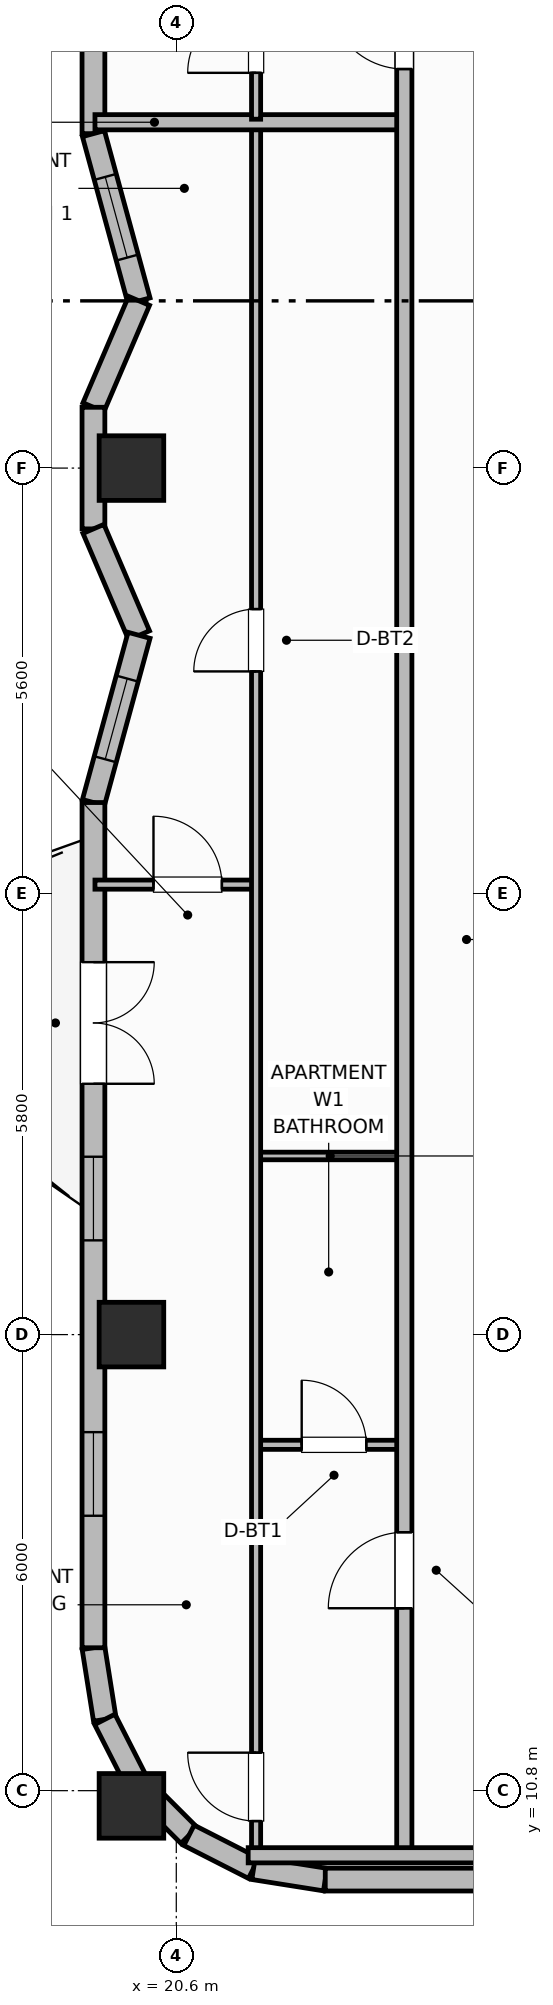
"""IFC4 building model, lengths in metres.
Left out: names, types, materials, properties, quantities, classifications, styles, units other than length and angle.
Written with IfcOpenShell. Run it as: python <this file> out.ifc"""

import sys

from ifc_helpers import new_model, si_unit, direction, frame, frame_2d, origin, origin_2d, place, context, subcontext, project, spatial, rectangle, extrude, element, fill, save


model = new_model("IFC4")
c1 = context("Model", 3, precision=1e-05, world=origin(), true_north=direction((0.0, 1.0)))
c2 = subcontext(c1, "Body", "Model", "MODEL_VIEW")
j1 = project(units=[si_unit("LENGTHUNIT", "METRE"), si_unit("PLANEANGLEUNIT", "RADIAN")], contexts=[c1])
p1 = place(None, origin())
s1 = spatial("IfcSite", under=j1, at=p1, CompositionType="ELEMENT")
p2 = place(p1, origin())
s2 = spatial("IfcBuilding", under=s1, at=p2, CompositionType="ELEMENT")
p3 = place(p2, frame((0.0, 0.0, 251.7)))
s3 = spatial("IfcBuildingStorey", under=s2, at=p3, CompositionType="ELEMENT", Elevation=251.7)
for number, where, z_axis, x_axis in (
    (1, (20.01, 10.6, 0.0), (0.0, 0.0, 1.0), (1.0, 0.0, 0.0)),
    (2, (20.01, 16.8, 0.0), (0.0, 0.0, 1.0), (1.0, 0.0, 0.0)),
    (3, (20.01, 28.2, 0.0), (0.0, 0.0, 1.0), (1.0, 0.0, 0.0)),
):
    element("IfcColumn", number, at=place(p3, frame(where, z_axis=z_axis, x_axis=x_axis)), inside=s3, PredefinedType="COLUMN", context=c2, shape_type="SweptSolid", body=[
        extrude(rectangle(XDim=0.85, YDim=0.85, at=origin_2d()), origin(), (0.0, 0.0, 1.0), 3.7),
    ])
p4 = place(p3, frame((19.51, 12.68, 0.0), z_axis=(0.0, 0.0, 1.0), x_axis=(0.156343617883, -0.987702725088, 0.0)))
e4 = element("IfcWall", 4, at=p4, inside=s3, PredefinedType="SOLIDWALL", context=c2, shape_type="SweptSolid", body=[
    extrude(rectangle(XDim=0.954, YDim=0.3, at=frame_2d((0.477, 0.0))), origin(), (0.0, 0.0, 1.0), 2.73),
])
for number, where, z_axis, x_axis in (
    (5, (19.659, 11.738, 0.0), (0.0, 0.0, 1.0), (0.454, -0.891, 0.0)),
    (6, (20.093, 10.887, 0.0), (0.0, 0.0, 1.0), (0.707, -0.707, 0.0)),
):
    element("IfcWall", number, at=place(p3, frame(where, z_axis=z_axis, x_axis=x_axis)), inside=s3, PredefinedType="SOLIDWALL", context=c2, shape_type="SweptSolid", body=[
        extrude(rectangle(XDim=0.954, YDim=0.3, at=frame_2d((0.477, 0.0))), origin(), (0.0, 0.0, 1.0), 2.73),
    ])
p5 = place(p3, frame((20.767, 10.212, 0.0), z_axis=(0.0, 0.0, 1.0), x_axis=(0.891023873617, -0.45395644796, 0.0)))
e7 = element("IfcWall", 7, at=p5, inside=s3, PredefinedType="SOLIDWALL", context=c2, shape_type="SweptSolid", body=[
    extrude(rectangle(XDim=0.954, YDim=0.3, at=frame_2d((0.477, 0.0))), origin(), (0.0, 0.0, 1.0), 2.73),
])
p6 = place(p3, frame((21.617, 9.779, 0.0), z_axis=(0.0, 0.0, 1.0), x_axis=(0.987669453596, -0.156553666304, 0.0)))
e8 = element("IfcWall", 8, at=p6, inside=s3, PredefinedType="SOLIDWALL", context=c2, shape_type="SweptSolid", body=[
    extrude(rectangle(XDim=0.954, YDim=0.3, at=frame_2d((0.477, 0.0))), origin(), (0.0, 0.0, 1.0), 2.73),
])
p7 = place(p3, frame((22.56, 9.63, 0.0), z_axis=(0.0, 0.0, 1.0), x_axis=(1.0, 0.0, 0.0)))
e9 = element("IfcWall", 9, at=p7, inside=s3, PredefinedType="SOLIDWALL", context=c2, shape_type="SweptSolid", body=[
    extrude(rectangle(XDim=33.28, YDim=0.3, at=frame_2d((16.64, 0.0))), origin(), (0.0, 0.0, 1.0), 2.73),
])
p8 = place(p7, frame((4.461, 0.0, 0.95)))
e10 = element("IfcOpeningElement", 10, at=p8, cuts=e9, PredefinedType="OPENING", context=c2, shape_type="SweptSolid", body=[
    extrude(rectangle(XDim=1.1, YDim=1.65, at=frame_2d((0.55, 0.825))), frame((0.0, 0.16, 0.0), z_axis=(0.0, -1.0, 0.0), x_axis=(1.0, 0.0, 0.0)), (0.0, 0.0, 1.0), 0.32),
])
p9 = place(p7, frame((7.368, 0.0, 0.95)))
e11 = element("IfcOpeningElement", 11, at=p9, cuts=e9, PredefinedType="OPENING", context=c2, shape_type="SweptSolid", body=[
    extrude(rectangle(XDim=1.1, YDim=1.65, at=frame_2d((0.55, 0.825))), frame((0.0, 0.16, 0.0), z_axis=(0.0, -1.0, 0.0), x_axis=(1.0, 0.0, 0.0)), (0.0, 0.0, 1.0), 0.32),
])
p10 = place(p7, frame((10.275, 0.0, 0.95)))
e12 = element("IfcOpeningElement", 12, at=p10, cuts=e9, PredefinedType="OPENING", context=c2, shape_type="SweptSolid", body=[
    extrude(rectangle(XDim=1.1, YDim=1.65, at=frame_2d((0.55, 0.825))), frame((0.0, 0.16, 0.0), z_axis=(0.0, -1.0, 0.0), x_axis=(1.0, 0.0, 0.0)), (0.0, 0.0, 1.0), 0.32),
])
p11 = place(p7, frame((13.883, 0.0, 0.95)))
e13 = element("IfcOpeningElement", 13, at=p11, cuts=e9, PredefinedType="OPENING", context=c2, shape_type="SweptSolid", body=[
    extrude(rectangle(XDim=1.1, YDim=1.65, at=frame_2d((0.55, 0.825))), frame((0.0, 0.16, 0.0), z_axis=(0.0, -1.0, 0.0), x_axis=(1.0, 0.0, 0.0)), (0.0, 0.0, 1.0), 0.32),
])
p12 = place(p7, frame((16.09, 0.0, 0.95)))
e14 = element("IfcOpeningElement", 14, at=p12, cuts=e9, PredefinedType="OPENING", context=c2, shape_type="SweptSolid", body=[
    extrude(rectangle(XDim=1.1, YDim=1.65, at=frame_2d((0.55, 0.825))), frame((0.0, 0.16, 0.0), z_axis=(0.0, -1.0, 0.0), x_axis=(1.0, 0.0, 0.0)), (0.0, 0.0, 1.0), 0.32),
])
p13 = place(p7, frame((18.297, 0.0, 0.95)))
e15 = element("IfcOpeningElement", 15, at=p13, cuts=e9, PredefinedType="OPENING", context=c2, shape_type="SweptSolid", body=[
    extrude(rectangle(XDim=1.1, YDim=1.65, at=frame_2d((0.55, 0.825))), frame((0.0, 0.16, 0.0), z_axis=(0.0, -1.0, 0.0), x_axis=(1.0, 0.0, 0.0)), (0.0, 0.0, 1.0), 0.32),
])
p14 = place(p7, frame((21.905, 0.0, 0.95)))
e16 = element("IfcOpeningElement", 16, at=p14, cuts=e9, PredefinedType="OPENING", context=c2, shape_type="SweptSolid", body=[
    extrude(rectangle(XDim=1.1, YDim=1.65, at=frame_2d((0.55, 0.825))), frame((0.0, 0.16, 0.0), z_axis=(0.0, -1.0, 0.0), x_axis=(1.0, 0.0, 0.0)), (0.0, 0.0, 1.0), 0.32),
])
p15 = place(p7, frame((24.812, 0.0, 0.95)))
e17 = element("IfcOpeningElement", 17, at=p15, cuts=e9, PredefinedType="OPENING", context=c2, shape_type="SweptSolid", body=[
    extrude(rectangle(XDim=1.1, YDim=1.65, at=frame_2d((0.55, 0.825))), frame((0.0, 0.16, 0.0), z_axis=(0.0, -1.0, 0.0), x_axis=(1.0, 0.0, 0.0)), (0.0, 0.0, 1.0), 0.32),
])
p16 = place(p7, frame((27.719, 0.0, 0.95)))
e18 = element("IfcOpeningElement", 18, at=p16, cuts=e9, PredefinedType="OPENING", context=c2, shape_type="SweptSolid", body=[
    extrude(rectangle(XDim=1.1, YDim=1.65, at=frame_2d((0.55, 0.825))), frame((0.0, 0.16, 0.0), z_axis=(0.0, -1.0, 0.0), x_axis=(1.0, 0.0, 0.0)), (0.0, 0.0, 1.0), 0.32),
])
p17 = place(p3, frame((19.51, 43.72, 0.0), z_axis=(0.0, 0.0, 1.0), x_axis=(0.0, -1.0, 0.0)))
e19 = element("IfcWall", 19, at=p17, inside=s3, PredefinedType="SOLIDWALL", context=c2, shape_type="SweptSolid", body=[
    extrude(rectangle(XDim=11.12, YDim=0.3, at=frame_2d((5.56, 0.0))), origin(), (0.0, 0.0, 1.0), 2.73),
])
p18 = place(p17, frame((1.237, 0.0, 0.76)))
e20 = element("IfcOpeningElement", 20, at=p18, cuts=e19, PredefinedType="OPENING", context=c2, shape_type="SweptSolid", body=[
    extrude(rectangle(XDim=1.4, YDim=1.85, at=frame_2d((0.7, 0.925))), frame((0.0, 0.16, 0.0), z_axis=(0.0, -1.0, 0.0), x_axis=(1.0, 0.0, 0.0)), (0.0, 0.0, 1.0), 0.32),
])
p19 = place(p17, frame((5.56, 0.0, 0.76)))
e21 = element("IfcOpeningElement", 21, at=p19, cuts=e19, PredefinedType="OPENING", context=c2, shape_type="SweptSolid", body=[
    extrude(rectangle(XDim=1.4, YDim=1.85, at=frame_2d((0.7, 0.925))), frame((0.0, 0.16, 0.0), z_axis=(0.0, -1.0, 0.0), x_axis=(1.0, 0.0, 0.0)), (0.0, 0.0, 1.0), 0.32),
])
p20 = place(p17, frame((8.133, 0.0, 0.76)))
e22 = element("IfcOpeningElement", 22, at=p20, cuts=e19, PredefinedType="OPENING", context=c2, shape_type="SweptSolid", body=[
    extrude(rectangle(XDim=1.4, YDim=1.85, at=frame_2d((0.7, 0.925))), frame((0.0, 0.16, 0.0), z_axis=(0.0, -1.0, 0.0), x_axis=(1.0, 0.0, 0.0)), (0.0, 0.0, 1.0), 0.32),
])
p21 = place(p3, frame((19.51, 32.6, 0.0), z_axis=(0.0, 0.0, 1.0), x_axis=(0.263135522356, -0.964758880174, 0.0)))
e23 = element("IfcWall", 23, at=p21, inside=s3, PredefinedType="SOLIDWALL", context=c2, shape_type="SweptSolid", body=[
    extrude(rectangle(XDim=2.281, YDim=0.3, at=frame_2d((1.14, 0.0))), origin(), (0.0, 0.0, 1.0), 2.73),
])
p22 = place(p21, frame((0.59, 0.0, 0.92)))
e24 = element("IfcOpeningElement", 24, at=p22, cuts=e23, PredefinedType="OPENING", context=c2, shape_type="SweptSolid", body=[
    extrude(rectangle(XDim=1.1, YDim=1.65, at=frame_2d((0.55, 0.825))), frame((0.0, 0.16, 0.0), z_axis=(0.0, -1.0, 0.0), x_axis=(1.0, 0.0, 0.0)), (0.0, 0.0, 1.0), 0.32),
])
p23 = place(p3, frame((20.11, 30.4, 0.0), z_axis=(0.0, 0.0, 1.0), x_axis=(-0.39399667932, -0.919111862988, 0.0)))
e25 = element("IfcWall", 25, at=p23, inside=s3, PredefinedType="SOLIDWALL", context=c2, shape_type="SweptSolid", body=[
    extrude(rectangle(XDim=1.523, YDim=0.3, at=frame_2d((0.762, 0.0))), origin(), (0.0, 0.0, 1.0), 2.73),
])
p24 = place(p3, frame((19.51, 29.0, 0.0), z_axis=(0.0, 0.0, 1.0), x_axis=(0.0, -1.0, 0.0)))
e26 = element("IfcWall", 26, at=p24, inside=s3, PredefinedType="SOLIDWALL", context=c2, shape_type="SweptSolid", body=[
    extrude(rectangle(XDim=1.6, YDim=0.3, at=frame_2d((0.8, 0.0))), origin(), (0.0, 0.0, 1.0), 2.73),
])
p25 = place(p3, frame((19.51, 27.4, 0.0), z_axis=(0.0, 0.0, 1.0), x_axis=(0.39399667932, -0.919111862988, 0.0)))
e27 = element("IfcWall", 27, at=p25, inside=s3, PredefinedType="SOLIDWALL", context=c2, shape_type="SweptSolid", body=[
    extrude(rectangle(XDim=1.523, YDim=0.3, at=frame_2d((0.762, 0.0))), origin(), (0.0, 0.0, 1.0), 2.73),
])
p26 = place(p3, frame((20.11, 26.0, 0.0), z_axis=(0.0, 0.0, 1.0), x_axis=(-0.263162701705, -0.964751466665, 0.0)))
e28 = element("IfcWall", 28, at=p26, inside=s3, PredefinedType="SOLIDWALL", context=c2, shape_type="SweptSolid", body=[
    extrude(rectangle(XDim=2.28, YDim=0.3, at=frame_2d((1.14, 0.0))), origin(), (0.0, 0.0, 1.0), 2.73),
])
p27 = place(p26, frame((0.59, 0.0, 0.92)))
e29 = element("IfcOpeningElement", 29, at=p27, cuts=e28, PredefinedType="OPENING", context=c2, shape_type="SweptSolid", body=[
    extrude(rectangle(XDim=1.1, YDim=1.65, at=frame_2d((0.55, 0.825))), frame((0.0, 0.16, 0.0), z_axis=(0.0, -1.0, 0.0), x_axis=(1.0, 0.0, 0.0)), (0.0, 0.0, 1.0), 0.32),
])
p28 = place(p3, frame((19.51, 23.8, 0.0), z_axis=(0.0, 0.0, 1.0), x_axis=(0.0, -1.0, 0.0)))
e30 = element("IfcWall", 30, at=p28, inside=s3, PredefinedType="SOLIDWALL", context=c2, shape_type="SweptSolid", body=[
    extrude(rectangle(XDim=11.12, YDim=0.3, at=frame_2d((5.56, 0.0))), origin(), (0.0, 0.0, 1.0), 2.73),
])
p29 = place(p28, frame((2.1, 0.0, 0.0)))
e31 = element("IfcOpeningElement", 31, at=p29, cuts=e30, PredefinedType="OPENING", context=c2, shape_type="SweptSolid", body=[
    extrude(rectangle(XDim=1.6, YDim=2.1, at=frame_2d((0.8, 1.05))), frame((0.0, 0.16, 0.0), z_axis=(0.0, -1.0, 0.0), x_axis=(1.0, 0.0, 0.0)), (0.0, 0.0, 1.0), 0.32),
])
p30 = place(p28, frame((4.66, 0.0, 0.95)))
e32 = element("IfcOpeningElement", 32, at=p30, cuts=e30, PredefinedType="OPENING", context=c2, shape_type="SweptSolid", body=[
    extrude(rectangle(XDim=1.1, YDim=1.65, at=frame_2d((0.55, 0.825))), frame((0.0, 0.16, 0.0), z_axis=(0.0, -1.0, 0.0), x_axis=(1.0, 0.0, 0.0)), (0.0, 0.0, 1.0), 0.32),
])
p31 = place(p28, frame((8.283, 0.0, 0.95)))
e33 = element("IfcOpeningElement", 33, at=p31, cuts=e30, PredefinedType="OPENING", context=c2, shape_type="SweptSolid", body=[
    extrude(rectangle(XDim=1.1, YDim=1.65, at=frame_2d((0.55, 0.825))), frame((0.0, 0.16, 0.0), z_axis=(0.0, -1.0, 0.0), x_axis=(1.0, 0.0, 0.0)), (0.0, 0.0, 1.0), 0.32),
])
p32 = place(p3, frame((21.65, 15.35, 0.0), z_axis=(0.0, 0.0, 1.0), x_axis=(1.0, 0.0, 0.0)))
e34 = element("IfcWall", 34, at=p32, inside=s3, PredefinedType="PARTITIONING", context=c2, shape_type="SweptSolid", body=[
    extrude(rectangle(XDim=1.95, YDim=0.12, at=frame_2d((0.975, 0.0))), origin(), (0.0, 0.0, 1.0), 2.56),
])
p33 = place(p32, frame((0.6, 0.0, 0.0)))
e35 = element("IfcOpeningElement", 35, at=p33, cuts=e34, PredefinedType="OPENING", context=c2, shape_type="SweptSolid", body=[
    extrude(rectangle(XDim=0.85, YDim=2.1, at=frame_2d((0.425, 1.05))), frame((0.0, 0.07, 0.0), z_axis=(0.0, -1.0, 0.0), x_axis=(1.0, 0.0, 0.0)), (0.0, 0.0, 1.0), 0.14),
])
p34 = place(p3, frame((21.65, 19.15, 0.0), z_axis=(0.0, 0.0, 1.0), x_axis=(1.0, 0.0, 0.0)))
e36 = element("IfcWall", 36, at=p34, inside=s3, PredefinedType="PARTITIONING", context=c2, shape_type="SweptSolid", body=[
    extrude(rectangle(XDim=1.95, YDim=0.1, at=frame_2d((0.975, 0.0))), origin(), (0.0, 0.0, 1.0), 2.56),
])
p35 = place(p3, frame((19.53, 22.72, 0.0), z_axis=(0.0, 0.0, 1.0), x_axis=(1.0, 0.0, 0.0)))
e37 = element("IfcWall", 37, at=p35, inside=s3, PredefinedType="PARTITIONING", context=c2, shape_type="SweptSolid", body=[
    extrude(rectangle(XDim=2.12, YDim=0.12, at=frame_2d((1.06, 0.0))), origin(), (0.0, 0.0, 1.0), 2.56),
])
p36 = place(p35, frame((0.77, 0.0, 0.0)))
e38 = element("IfcOpeningElement", 38, at=p36, cuts=e37, PredefinedType="OPENING", context=c2, shape_type="SweptSolid", body=[
    extrude(rectangle(XDim=0.9, YDim=2.1, at=frame_2d((0.45, 1.05))), frame((0.0, 0.07, 0.0), z_axis=(0.0, -1.0, 0.0), x_axis=(1.0, 0.0, 0.0)), (0.0, 0.0, 1.0), 0.14),
])
p37 = place(p3, frame((21.65, 9.99, 0.0), z_axis=(0.0, 0.0, 1.0), x_axis=(0.0, 1.0, 0.0)))
e39 = element("IfcWall", 39, at=p37, inside=s3, PredefinedType="PARTITIONING", context=c2, shape_type="SweptSolid", body=[
    extrude(rectangle(XDim=22.72, YDim=0.12, at=frame_2d((11.36, 0.0))), origin(), (0.0, 0.0, 1.0), 2.56),
])
p38 = place(p37, frame((0.41, 0.0, 0.0)))
e40 = element("IfcOpeningElement", 40, at=p38, cuts=e39, PredefinedType="OPENING", context=c2, shape_type="SweptSolid", body=[
    extrude(rectangle(XDim=0.9, YDim=2.1, at=frame_2d((0.45, 1.05))), frame((0.0, 0.07, 0.0), z_axis=(0.0, -1.0, 0.0), x_axis=(1.0, 0.0, 0.0)), (0.0, 0.0, 1.0), 0.14),
])
p39 = place(p37, frame((15.535, 0.0, 0.0)))
e41 = element("IfcOpeningElement", 41, at=p39, cuts=e39, PredefinedType="OPENING", context=c2, shape_type="SweptSolid", body=[
    extrude(rectangle(XDim=0.82, YDim=2.08, at=frame_2d((0.41, 1.04))), frame((0.0, 0.07, 0.0), z_axis=(0.0, -1.0, 0.0), x_axis=(1.0, 0.0, 0.0)), (0.0, 0.0, 1.0), 0.14),
])
p40 = place(p3, frame((19.53, 32.75, 0.0), z_axis=(0.0, 0.0, 1.0), x_axis=(1.0, 0.0, 0.0)))
e42 = element("IfcWall", 42, at=p40, inside=s3, PredefinedType="PARTITIONING", context=c2, shape_type="SweptSolid", body=[
    extrude(rectangle(XDim=4.07, YDim=0.2, at=frame_2d((2.035, 0.0))), origin(), (0.0, 0.0, 1.0), 2.56),
])
p41 = place(p3, frame((21.65, 32.79, 0.0), z_axis=(0.0, 0.0, 1.0), x_axis=(0.0, 1.0, 0.0)))
e43 = element("IfcWall", 43, at=p41, inside=s3, PredefinedType="PARTITIONING", context=c2, shape_type="SweptSolid", body=[
    extrude(rectangle(XDim=13.62, YDim=0.12, at=frame_2d((6.81, 0.0))), origin(), (0.0, 0.0, 1.0), 2.56),
])
p42 = place(p41, frame((0.61, 0.0, 0.0)))
e44 = element("IfcOpeningElement", 44, at=p42, cuts=e43, PredefinedType="OPENING", context=c2, shape_type="SweptSolid", body=[
    extrude(rectangle(XDim=0.9, YDim=2.1, at=frame_2d((0.45, 1.05))), frame((0.0, 0.07, 0.0), z_axis=(0.0, -1.0, 0.0), x_axis=(1.0, 0.0, 0.0)), (0.0, 0.0, 1.0), 0.14),
])
p43 = place(p41, frame((10.985, 0.0, 0.0)))
e45 = element("IfcOpeningElement", 45, at=p43, cuts=e43, PredefinedType="OPENING", context=c2, shape_type="SweptSolid", body=[
    extrude(rectangle(XDim=0.82, YDim=2.08, at=frame_2d((0.41, 1.04))), frame((0.0, 0.07, 0.0), z_axis=(0.0, -1.0, 0.0), x_axis=(1.0, 0.0, 0.0)), (0.0, 0.0, 1.0), 0.14),
])
p44 = place(p3, frame((23.6, 9.95, 0.0), z_axis=(0.0, 0.0, 1.0), x_axis=(0.0, 1.0, 0.0)))
e46 = element("IfcWall", 46, at=p44, inside=s3, PredefinedType="PARTITIONING", context=c2, shape_type="SweptSolid", body=[
    extrude(rectangle(XDim=36.5, YDim=0.2, at=frame_2d((18.25, 0.0))), origin(), (0.0, 0.0, 1.0), 2.56),
])
p45 = place(p44, frame((3.25, 0.0, 0.0)))
e47 = element("IfcOpeningElement", 47, at=p45, cuts=e46, PredefinedType="OPENING", context=c2, shape_type="SweptSolid", body=[
    extrude(rectangle(XDim=1.0, YDim=2.15, at=frame_2d((0.5, 1.075))), frame((0.0, 0.11, 0.0), z_axis=(0.0, -1.0, 0.0), x_axis=(1.0, 0.0, 0.0)), (0.0, 0.0, 1.0), 0.22),
])
p46 = place(p44, frame((23.5, 0.0, 0.0)))
e48 = element("IfcOpeningElement", 48, at=p46, cuts=e46, PredefinedType="OPENING", context=c2, shape_type="SweptSolid", body=[
    extrude(rectangle(XDim=1.0, YDim=2.15, at=frame_2d((0.5, 1.075))), frame((0.0, 0.11, 0.0), z_axis=(0.0, -1.0, 0.0), x_axis=(1.0, 0.0, 0.0)), (0.0, 0.0, 1.0), 0.22),
])
p47 = place(p3, frame((21.546, 9.95, 0.0), z_axis=(0.0, 0.0, 1.0), x_axis=(1.0, 0.0, 0.0)))
e49 = element("IfcWall", 49, at=p47, inside=s3, PredefinedType="PARTITIONING", context=c2, shape_type="SweptSolid", body=[
    extrude(rectangle(XDim=3.754, YDim=0.2, at=frame_2d((1.877, 0.0))), origin(), (0.0, 0.0, 1.0), 2.56),
])
p48 = place(p22, origin())
e50 = element("IfcWindow", 50, at=p48, inside=s3, PartitioningType="SINGLE_PANEL", PredefinedType="WINDOW", context=c2, shape_type="SweptSolid", body=[
    extrude(rectangle(XDim=1.1, YDim=1.65, at=frame_2d((0.55, 0.825))), frame((0.0, 0.03, 0.0), z_axis=(0.0, -1.0, 0.0), x_axis=(1.0, 0.0, 0.0)), (0.0, 0.0, 1.0), 0.06),
])
fill(e24, e50)
p49 = place(p27, origin())
e51 = element("IfcWindow", 51, at=p49, inside=s3, PartitioningType="SINGLE_PANEL", PredefinedType="WINDOW", context=c2, shape_type="SweptSolid", body=[
    extrude(rectangle(XDim=1.1, YDim=1.65, at=frame_2d((0.55, 0.825))), frame((0.0, 0.03, 0.0), z_axis=(0.0, -1.0, 0.0), x_axis=(1.0, 0.0, 0.0)), (0.0, 0.0, 1.0), 0.06),
])
fill(e29, e51)
p50 = place(p29, origin())
e52 = element("IfcDoor", 52, at=p50, inside=s3, OperationType="DOUBLE_DOOR_SINGLE_SWING", PredefinedType="DOOR", context=c2, shape_type="SweptSolid", body=[
    extrude(rectangle(XDim=1.6, YDim=2.1, at=frame_2d((0.8, 1.05))), frame((0.0, 0.025, 0.0), z_axis=(0.0, -1.0, 0.0), x_axis=(1.0, 0.0, 0.0)), (0.0, 0.0, 1.0), 0.05),
])
fill(e31, e52)
p51 = place(p30, origin())
e53 = element("IfcWindow", 53, at=p51, inside=s3, PartitioningType="SINGLE_PANEL", PredefinedType="WINDOW", context=c2, shape_type="SweptSolid", body=[
    extrude(rectangle(XDim=1.1, YDim=1.65, at=frame_2d((0.55, 0.825))), frame((0.0, 0.03, 0.0), z_axis=(0.0, -1.0, 0.0), x_axis=(1.0, 0.0, 0.0)), (0.0, 0.0, 1.0), 0.06),
])
fill(e32, e53)
p52 = place(p31, origin())
e54 = element("IfcWindow", 54, at=p52, inside=s3, PartitioningType="SINGLE_PANEL", PredefinedType="WINDOW", context=c2, shape_type="SweptSolid", body=[
    extrude(rectangle(XDim=1.1, YDim=1.65, at=frame_2d((0.55, 0.825))), frame((0.0, 0.03, 0.0), z_axis=(0.0, -1.0, 0.0), x_axis=(1.0, 0.0, 0.0)), (0.0, 0.0, 1.0), 0.06),
])
fill(e33, e54)
p53 = place(p33, origin())
e55 = element("IfcDoor", 55, at=p53, inside=s3, OperationType="SINGLE_SWING_LEFT", PredefinedType="DOOR", context=c2, shape_type="SweptSolid", body=[
    extrude(rectangle(XDim=0.85, YDim=2.1, at=frame_2d((0.425, 1.05))), frame((0.0, 0.025, 0.0), z_axis=(0.0, -1.0, 0.0), x_axis=(1.0, 0.0, 0.0)), (0.0, 0.0, 1.0), 0.05),
])
fill(e35, e55)
p54 = place(p36, origin())
e56 = element("IfcDoor", 56, at=p54, inside=s3, OperationType="SINGLE_SWING_LEFT", PredefinedType="DOOR", context=c2, shape_type="SweptSolid", body=[
    extrude(rectangle(XDim=0.9, YDim=2.1, at=frame_2d((0.45, 1.05))), frame((0.0, 0.025, 0.0), z_axis=(0.0, -1.0, 0.0), x_axis=(1.0, 0.0, 0.0)), (0.0, 0.0, 1.0), 0.05),
])
fill(e38, e56)
p55 = place(p38, origin())
e57 = element("IfcDoor", 57, at=p55, inside=s3, OperationType="SINGLE_SWING_RIGHT", PredefinedType="DOOR", context=c2, shape_type="SweptSolid", body=[
    extrude(rectangle(XDim=0.9, YDim=2.1, at=frame_2d((0.45, 1.05))), frame((0.0, 0.025, 0.0), z_axis=(0.0, -1.0, 0.0), x_axis=(1.0, 0.0, 0.0)), (0.0, 0.0, 1.0), 0.05),
])
fill(e40, e57)
p56 = place(p39, origin())
e58 = element("IfcDoor", 58, at=p56, inside=s3, OperationType="SINGLE_SWING_LEFT", PredefinedType="DOOR", context=c2, shape_type="SweptSolid", body=[
    extrude(rectangle(XDim=0.82, YDim=2.08, at=frame_2d((0.41, 1.04))), frame((0.0, 0.025, 0.0), z_axis=(0.0, -1.0, 0.0), x_axis=(1.0, 0.0, 0.0)), (0.0, 0.0, 1.0), 0.05),
])
fill(e41, e58)
p57 = place(p42, origin())
e59 = element("IfcDoor", 59, at=p57, inside=s3, OperationType="SINGLE_SWING_LEFT", PredefinedType="DOOR", context=c2, shape_type="SweptSolid", body=[
    extrude(rectangle(XDim=0.9, YDim=2.1, at=frame_2d((0.45, 1.05))), frame((0.0, 0.025, 0.0), z_axis=(0.0, -1.0, 0.0), x_axis=(1.0, 0.0, 0.0)), (0.0, 0.0, 1.0), 0.05),
])
fill(e44, e59)
p58 = place(p45, origin())
e60 = element("IfcDoor", 60, at=p58, inside=s3, OperationType="SINGLE_SWING_LEFT", PredefinedType="DOOR", context=c2, shape_type="SweptSolid", body=[
    extrude(rectangle(XDim=1.0, YDim=2.15, at=frame_2d((0.5, 1.075))), frame((0.0, 0.025, 0.0), z_axis=(0.0, -1.0, 0.0), x_axis=(1.0, 0.0, 0.0)), (0.0, 0.0, 1.0), 0.05),
])
fill(e47, e60)
p59 = place(p46, origin())
e61 = element("IfcDoor", 61, at=p59, inside=s3, OperationType="SINGLE_SWING_RIGHT", PredefinedType="DOOR", context=c2, shape_type="SweptSolid", body=[
    extrude(rectangle(XDim=1.0, YDim=2.15, at=frame_2d((0.5, 1.075))), frame((0.0, 0.025, 0.0), z_axis=(0.0, -1.0, 0.0), x_axis=(1.0, 0.0, 0.0)), (0.0, 0.0, 1.0), 0.05),
])
fill(e48, e61)
save(model, sys.argv[1])
